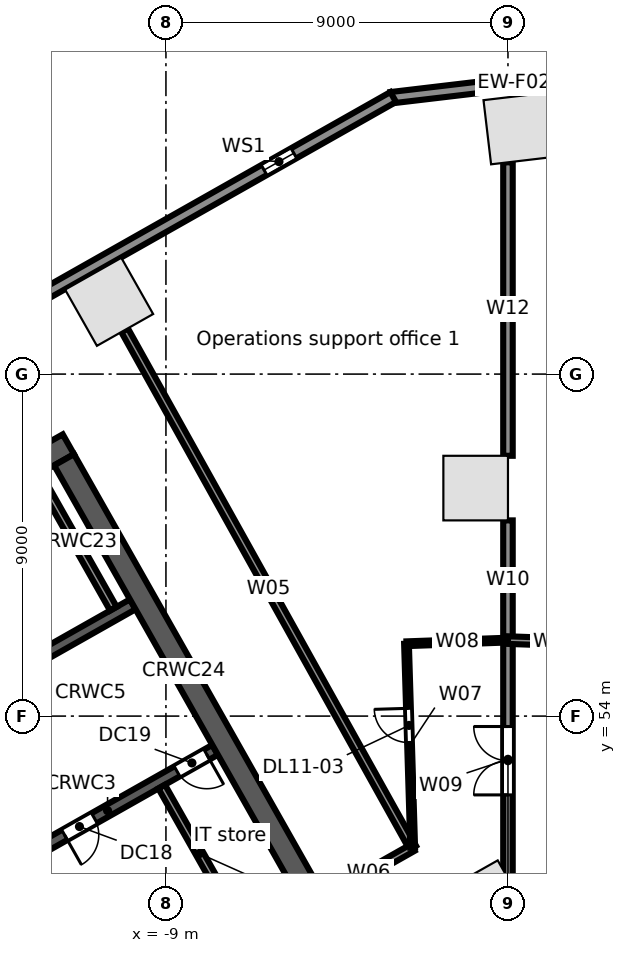
"""IFC4 building model, lengths in metres.
Left out: names, types, materials, properties, quantities, classifications, styles, units other than length and angle.
Written with IfcOpenShell. Run it as: python <this file> out.ifc"""

import sys

from ifc_helpers import new_model, si_unit, direction, frame, frame_2d, origin, origin_2d, place, context, subcontext, project, spatial, rectangle, extrude, element, fill, save


model = new_model("IFC4")
c1 = context("Model", 3, precision=1e-05, world=origin(), true_north=direction((0.0, 1.0)))
c2 = subcontext(c1, "Body", "Model", "MODEL_VIEW")
j1 = project(units=[si_unit("LENGTHUNIT", "METRE"), si_unit("PLANEANGLEUNIT", "RADIAN")], contexts=[c1])
p1 = place(None, origin())
s1 = spatial("IfcSite", under=j1, at=p1, CompositionType="ELEMENT")
p2 = place(p1, origin())
s2 = spatial("IfcBuilding", under=s1, at=p2, CompositionType="ELEMENT")
p3 = place(p2, frame((0.0, 0.0, 66.5)))
s3 = spatial("IfcBuildingStorey", under=s2, at=p3, CompositionType="ELEMENT", Elevation=66.5)
for number, where, z_axis, x_axis in (
    (1, (0.3, 69.464, 0.0), (0.0, 0.0, 1.0), (-0.993, -0.118, 0.0)),
    (2, (-10.495, 64.902, 0.0), (0.0, 0.0, 1.0), (-0.87, -0.492, 0.0)),
    (3, (-0.591, 49.044, 0.0), (0.0, 0.0, 1.0), (0.87, 0.492, 0.0)),
    (4, (-0.85, 60.0, 0.0), (0.0, 0.0, 1.0), (0.0, 1.0, 0.0)),
):
    element("IfcColumn", number, at=place(p3, frame(where, z_axis=z_axis, x_axis=x_axis)), inside=s3, PredefinedType="COLUMN", context=c2, shape_type="SweptSolid", body=[
        extrude(rectangle(XDim=1.7, YDim=1.7, at=origin_2d()), origin(), (0.0, 0.0, 1.0), 5.0),
    ])
p4 = place(p3, frame((-3.076, 70.273, 0.0), z_axis=(0.0, 0.0, 1.0), x_axis=(0.993067743007, 0.117543429416, 0.0)))
e5 = element("IfcWall", 5, at=p4, inside=s3, PredefinedType="STANDARD", context=c2, shape_type="SweptSolid", body=[
    extrude(rectangle(XDim=6.516, YDim=0.3, at=frame_2d((3.258, 0.0))), origin(), (0.0, 0.0, 1.0), 4.68),
])
p5 = place(p3, frame((-58.745, 38.764, 0.0), z_axis=(0.0, 0.0, 1.0), x_axis=(0.870355811726, 0.492423355453, 0.0)))
e6 = element("IfcWall", 6, at=p5, inside=s3, PredefinedType="STANDARD", context=c2, shape_type="SweptSolid", body=[
    extrude(rectangle(XDim=64.025, YDim=0.3, at=frame_2d((32.013, 0.0))), origin(), (0.0, 0.0, 1.0), 4.68),
])
p6 = place(p5, frame((60.122, 0.0, 0.6)))
e7 = element("IfcOpeningElement", 7, at=p6, cuts=e6, PredefinedType="OPENING", context=c2, shape_type="SweptSolid", body=[
    extrude(rectangle(XDim=0.9, YDim=3.2, at=frame_2d((0.45, 1.6))), frame((0.0, 0.16, 0.0), z_axis=(0.0, -1.0, 0.0), x_axis=(1.0, 0.0, 0.0)), (0.0, 0.0, 1.0), 0.32),
])
p7 = place(p5, frame((50.992, 0.0, 0.6)))
e8 = element("IfcOpeningElement", 8, at=p7, cuts=e6, PredefinedType="OPENING", context=c2, shape_type="SweptSolid", body=[
    extrude(rectangle(XDim=0.9, YDim=3.2, at=frame_2d((0.45, 1.6))), frame((0.0, 0.16, 0.0), z_axis=(0.0, -1.0, 0.0), x_axis=(1.0, 0.0, 0.0)), (0.0, 0.0, 1.0), 0.32),
])
p8 = place(p5, frame((41.862, 0.0, 0.6)))
e9 = element("IfcOpeningElement", 9, at=p8, cuts=e6, PredefinedType="OPENING", context=c2, shape_type="SweptSolid", body=[
    extrude(rectangle(XDim=0.9, YDim=3.2, at=frame_2d((0.45, 1.6))), frame((0.0, 0.16, 0.0), z_axis=(0.0, -1.0, 0.0), x_axis=(1.0, 0.0, 0.0)), (0.0, 0.0, 1.0), 0.32),
])
p9 = place(p5, frame((32.732, 0.0, 0.6)))
e10 = element("IfcOpeningElement", 10, at=p9, cuts=e6, PredefinedType="OPENING", context=c2, shape_type="SweptSolid", body=[
    extrude(rectangle(XDim=0.9, YDim=3.2, at=frame_2d((0.45, 1.6))), frame((0.0, 0.16, 0.0), z_axis=(0.0, -1.0, 0.0), x_axis=(1.0, 0.0, 0.0)), (0.0, 0.0, 1.0), 0.32),
])
p10 = place(p5, frame((23.602, 0.0, 0.6)))
e11 = element("IfcOpeningElement", 11, at=p10, cuts=e6, PredefinedType="OPENING", context=c2, shape_type="SweptSolid", body=[
    extrude(rectangle(XDim=0.9, YDim=3.2, at=frame_2d((0.45, 1.6))), frame((0.0, 0.16, 0.0), z_axis=(0.0, -1.0, 0.0), x_axis=(1.0, 0.0, 0.0)), (0.0, 0.0, 1.0), 0.32),
])
p11 = place(p5, frame((14.472, 0.0, 0.6)))
e12 = element("IfcOpeningElement", 12, at=p11, cuts=e6, PredefinedType="OPENING", context=c2, shape_type="SweptSolid", body=[
    extrude(rectangle(XDim=0.9, YDim=3.2, at=frame_2d((0.45, 1.6))), frame((0.0, 0.16, 0.0), z_axis=(0.0, -1.0, 0.0), x_axis=(1.0, 0.0, 0.0)), (0.0, 0.0, 1.0), 0.32),
])
p12 = place(p5, frame((5.342, 0.0, 0.6)))
e13 = element("IfcOpeningElement", 13, at=p12, cuts=e6, PredefinedType="OPENING", context=c2, shape_type="SweptSolid", body=[
    extrude(rectangle(XDim=0.9, YDim=3.2, at=frame_2d((0.45, 1.6))), frame((0.0, 0.16, 0.0), z_axis=(0.0, -1.0, 0.0), x_axis=(1.0, 0.0, 0.0)), (0.0, 0.0, 1.0), 0.32),
])
p13 = place(p3, frame((-13.365, 49.911, 0.0), z_axis=(0.0, 0.0, 1.0), x_axis=(0.870340995471, 0.49244954219, 0.0)))
e14 = element("IfcWall", 14, at=p13, inside=s3, PredefinedType="SOLIDWALL", context=c2, shape_type="SweptSolid", body=[
    extrude(rectangle(XDim=6.5, YDim=0.3, at=frame_2d((3.25, 0.0))), origin(), (0.0, 0.0, 1.0), 4.68),
])
p14 = place(p13, frame((1.95, 0.0, 0.0)))
e15 = element("IfcOpeningElement", 15, at=p14, cuts=e14, PredefinedType="OPENING", context=c2, shape_type="SweptSolid", body=[
    extrude(rectangle(XDim=0.9, YDim=2.1, at=frame_2d((0.45, 1.05))), frame((0.0, 0.16, 0.0), z_axis=(0.0, -1.0, 0.0), x_axis=(1.0, 0.0, 0.0)), (0.0, 0.0, 1.0), 0.32),
])
p15 = place(p13, frame((5.35, 0.0, 0.0)))
e16 = element("IfcOpeningElement", 16, at=p15, cuts=e14, PredefinedType="OPENING", context=c2, shape_type="SweptSolid", body=[
    extrude(rectangle(XDim=0.9, YDim=2.1, at=frame_2d((0.45, 1.05))), frame((0.0, 0.16, 0.0), z_axis=(0.0, -1.0, 0.0), x_axis=(1.0, 0.0, 0.0)), (0.0, 0.0, 1.0), 0.32),
])
p16 = place(p3, frame((-15.618, 53.691, 0.0), z_axis=(0.0, 0.0, 1.0), x_axis=(0.870356769198, 0.492421663121, 0.0)))
e17 = element("IfcWall", 17, at=p16, inside=s3, PredefinedType="SOLIDWALL", context=c2, shape_type="SweptSolid", body=[
    extrude(rectangle(XDim=6.6, YDim=0.3, at=frame_2d((3.3, 0.0))), origin(), (0.0, 0.0, 1.0), 4.68),
])
p17 = place(p16, frame((2.6, 0.0, 0.0)))
e18 = element("IfcOpeningElement", 18, at=p17, cuts=e17, PredefinedType="OPENING", context=c2, shape_type="SweptSolid", body=[
    extrude(rectangle(XDim=0.9, YDim=2.1, at=frame_2d((0.45, 1.05))), frame((0.0, 0.16, 0.0), z_axis=(0.0, -1.0, 0.0), x_axis=(1.0, 0.0, 0.0)), (0.0, 0.0, 1.0), 0.32),
])
p18 = place(p3, frame((-24.623, 53.767, 0.0), z_axis=(0.0, 0.0, 1.0), x_axis=(0.870356627484, 0.492421913601, 0.0)))
e19 = element("IfcWall", 19, at=p18, inside=s3, PredefinedType="SOLIDWALL", context=c2, shape_type="SweptSolid", body=[
    extrude(rectangle(XDim=15.0, YDim=0.6, at=frame_2d((7.5, 0.0))), origin(), (0.0, 0.0, 1.0), 4.68),
])
p19 = place(p3, frame((-9.113, 52.144, 0.0), z_axis=(0.0, 0.0, 1.0), x_axis=(0.492394910396, -0.870371904542, 0.0)))
e20 = element("IfcWall", 20, at=p19, inside=s3, PredefinedType="PARTITIONING", context=c2, shape_type="SweptSolid", body=[
    extrude(rectangle(XDim=4.05, YDim=0.2, at=frame_2d((2.025, 0.0))), origin(), (0.0, 0.0, 1.0), 4.68),
])
p20 = place(p3, frame((-12.377, 60.351, 0.0), z_axis=(0.0, 0.0, 1.0), x_axis=(0.492440575896, -0.870346068648, 0.0)))
e21 = element("IfcWall", 21, at=p20, inside=s3, PredefinedType="SOLIDWALL", context=c2, shape_type="SweptSolid", body=[
    extrude(rectangle(XDim=4.05, YDim=0.2, at=frame_2d((2.025, 0.0))), origin(), (0.0, 0.0, 1.0), 4.68),
])
p21 = place(p3, frame((-11.681, 60.744, 0.0), z_axis=(0.0, 0.0, 1.0), x_axis=(0.492426772896, -0.870353878221, 0.0)))
e22 = element("IfcWall", 22, at=p21, inside=s3, PredefinedType="SOLIDWALL", context=c2, shape_type="SweptSolid", body=[
    extrude(rectangle(XDim=12.8, YDim=0.6, at=frame_2d((6.4, 0.0))), origin(), (0.0, 0.0, 1.0), 4.68),
])
p22 = place(p3, frame((-10.088, 64.155, 0.0), z_axis=(0.0, 0.0, 1.0), x_axis=(0.486446127767, -0.873710572661, 0.0)))
e23 = element("IfcWall", 23, at=p22, inside=s3, PredefinedType="PARTITIONING", context=c2, shape_type="SweptSolid", body=[
    extrude(rectangle(XDim=15.584, YDim=0.2, at=frame_2d((7.792, 0.0))), origin(), (0.0, 0.0, 1.0), 3.76),
])
p23 = place(p3, frame((-4.821, 49.23, 0.0), z_axis=(0.0, 0.0, 1.0), x_axis=(0.870371217631, 0.492396124598, 0.0)))
e24 = element("IfcWall", 24, at=p23, inside=s3, PredefinedType="PARTITIONING", context=c2, shape_type="SweptSolid", body=[
    extrude(rectangle(XDim=2.659, YDim=0.2, at=frame_2d((1.329, 0.0))), origin(), (0.0, 0.0, 1.0), 4.68),
])
p24 = place(p3, frame((-2.67, 55.904, 0.0), z_axis=(0.0, 0.0, 1.0), x_axis=(0.030338701418, -0.999539675649, 0.0)))
e25 = element("IfcWall", 25, at=p24, inside=s3, PredefinedType="PARTITIONING", context=c2, shape_type="SweptSolid", body=[
    extrude(rectangle(XDim=5.367, YDim=0.125, at=frame_2d((2.684, 0.0))), origin(), (0.0, 0.0, 1.0), 4.68),
])
p25 = place(p24, frame((1.7, 0.0, 0.0)))
e26 = element("IfcOpeningElement", 26, at=p25, cuts=e25, PredefinedType="OPENING", context=c2, shape_type="SweptSolid", body=[
    extrude(rectangle(XDim=0.9, YDim=2.1, at=frame_2d((0.45, 1.05))), frame((0.0, 0.073, 0.0), z_axis=(0.0, -1.0, 0.0), x_axis=(1.0, 0.0, 0.0)), (0.0, 0.0, 1.0), 0.145),
])
p26 = place(p3, frame((-2.67, 55.904, 0.0), z_axis=(0.0, 0.0, 1.0), x_axis=(0.999354913865, 0.03591317494, 0.0)))
e27 = element("IfcWall", 27, at=p26, inside=s3, PredefinedType="PARTITIONING", context=c2, shape_type="SweptSolid", body=[
    extrude(rectangle(XDim=2.672, YDim=0.125, at=frame_2d((1.336, 0.0))), origin(), (0.0, 0.0, 1.0), 3.742),
])
p27 = place(p3, frame((0.0, 49.726, 0.0), z_axis=(0.0, 0.0, 1.0), x_axis=(0.0, 1.0, 0.0)))
e28 = element("IfcWall", 28, at=p27, inside=s3, PredefinedType="PARTITIONING", context=c2, shape_type="SweptSolid", body=[
    extrude(rectangle(XDim=6.274, YDim=0.25, at=frame_2d((3.137, 0.0))), origin(), (0.0, 0.0, 1.0), 4.68),
])
p28 = place(p27, frame((2.2, 0.0, 0.0)))
e29 = element("IfcOpeningElement", 29, at=p28, cuts=e28, PredefinedType="OPENING", context=c2, shape_type="SweptSolid", body=[
    extrude(rectangle(XDim=1.8, YDim=2.1, at=frame_2d((0.9, 1.05))), frame((0.0, 0.135, 0.0), z_axis=(0.0, -1.0, 0.0), x_axis=(1.0, 0.0, 0.0)), (0.0, 0.0, 1.0), 0.27),
])
p29 = place(p3, frame((0.0, 56.0, 0.0), z_axis=(0.0, 0.0, 1.0), x_axis=(0.0, 1.0, 0.0)))
e30 = element("IfcWall", 30, at=p29, inside=s3, PredefinedType="PARTITIONING", context=c2, shape_type="SweptSolid", body=[
    extrude(rectangle(XDim=3.15, YDim=0.25, at=frame_2d((1.575, 0.0))), origin(), (0.0, 0.0, 1.0), 4.68),
])
p30 = place(p3, frame((0.0, 56.0, 0.0), z_axis=(0.0, 0.0, 1.0), x_axis=(0.999349313684, -0.036068673934, 0.0)))
e31 = element("IfcWall", 31, at=p30, inside=s3, PredefinedType="PARTITIONING", context=c2, shape_type="SweptSolid", body=[
    extrude(rectangle(XDim=2.471, YDim=0.2, at=frame_2d((1.235, 0.0))), origin(), (0.0, 0.0, 1.0), 4.68),
])
p31 = place(p3, frame((0.0, 60.85, 0.0), z_axis=(0.0, 0.0, 1.0), x_axis=(0.0, 1.0, 0.0)))
e32 = element("IfcWall", 32, at=p31, inside=s3, PredefinedType="PARTITIONING", context=c2, shape_type="SweptSolid", body=[
    extrude(rectangle(XDim=7.723, YDim=0.25, at=frame_2d((3.861, 0.0))), origin(), (0.0, 0.0, 1.0), 3.952),
])
p32 = place(p6, origin())
e33 = element("IfcWindow", 33, at=p32, inside=s3, PartitioningType="SINGLE_PANEL", PredefinedType="WINDOW", context=c2, shape_type="SweptSolid", body=[
    extrude(rectangle(XDim=0.9, YDim=3.2, at=frame_2d((0.45, 1.6))), frame((0.0, 0.03, 0.0), z_axis=(0.0, -1.0, 0.0), x_axis=(1.0, 0.0, 0.0)), (0.0, 0.0, 1.0), 0.06),
])
fill(e7, e33)
p33 = place(p14, frame((0.9, 0.0, 0.0), z_axis=(0.0, 0.0, 1.0), x_axis=(-1.0, 0.0, 0.0)))
e34 = element("IfcDoor", 34, at=p33, inside=s3, OperationType="SINGLE_SWING_RIGHT", PredefinedType="DOOR", context=c2, shape_type="SweptSolid", body=[
    extrude(rectangle(XDim=0.9, YDim=2.1, at=frame_2d((0.45, 1.05))), frame((0.0, 0.025, 0.0), z_axis=(0.0, -1.0, 0.0), x_axis=(1.0, 0.0, 0.0)), (0.0, 0.0, 1.0), 0.05),
])
fill(e15, e34)
p34 = place(p15, frame((0.9, 0.0, 0.0), z_axis=(0.0, 0.0, 1.0), x_axis=(-1.0, 0.0, 0.0)))
e35 = element("IfcDoor", 35, at=p34, inside=s3, OperationType="SINGLE_SWING_LEFT", PredefinedType="DOOR", context=c2, shape_type="SweptSolid", body=[
    extrude(rectangle(XDim=0.9, YDim=2.1, at=frame_2d((0.45, 1.05))), frame((0.0, 0.025, 0.0), z_axis=(0.0, -1.0, 0.0), x_axis=(1.0, 0.0, 0.0)), (0.0, 0.0, 1.0), 0.05),
])
fill(e16, e35)
p35 = place(p25, frame((0.9, 0.0, 0.0), z_axis=(0.0, 0.0, 1.0), x_axis=(-1.0, 0.0, 0.0)))
e36 = element("IfcDoor", 36, at=p35, inside=s3, OperationType="SINGLE_SWING_RIGHT", PredefinedType="DOOR", context=c2, shape_type="SweptSolid", body=[
    extrude(rectangle(XDim=0.9, YDim=2.1, at=frame_2d((0.45, 1.05))), frame((0.0, 0.025, 0.0), z_axis=(0.0, -1.0, 0.0), x_axis=(1.0, 0.0, 0.0)), (0.0, 0.0, 1.0), 0.05),
])
fill(e26, e36)
p36 = place(p28, origin())
e37 = element("IfcDoor", 37, at=p36, inside=s3, OperationType="DOUBLE_DOOR_SINGLE_SWING", PredefinedType="DOOR", context=c2, shape_type="SweptSolid", body=[
    extrude(rectangle(XDim=1.8, YDim=2.1, at=frame_2d((0.9, 1.05))), frame((0.0, 0.025, 0.0), z_axis=(0.0, -1.0, 0.0), x_axis=(1.0, 0.0, 0.0)), (0.0, 0.0, 1.0), 0.05),
])
fill(e29, e37)
save(model, sys.argv[1])
